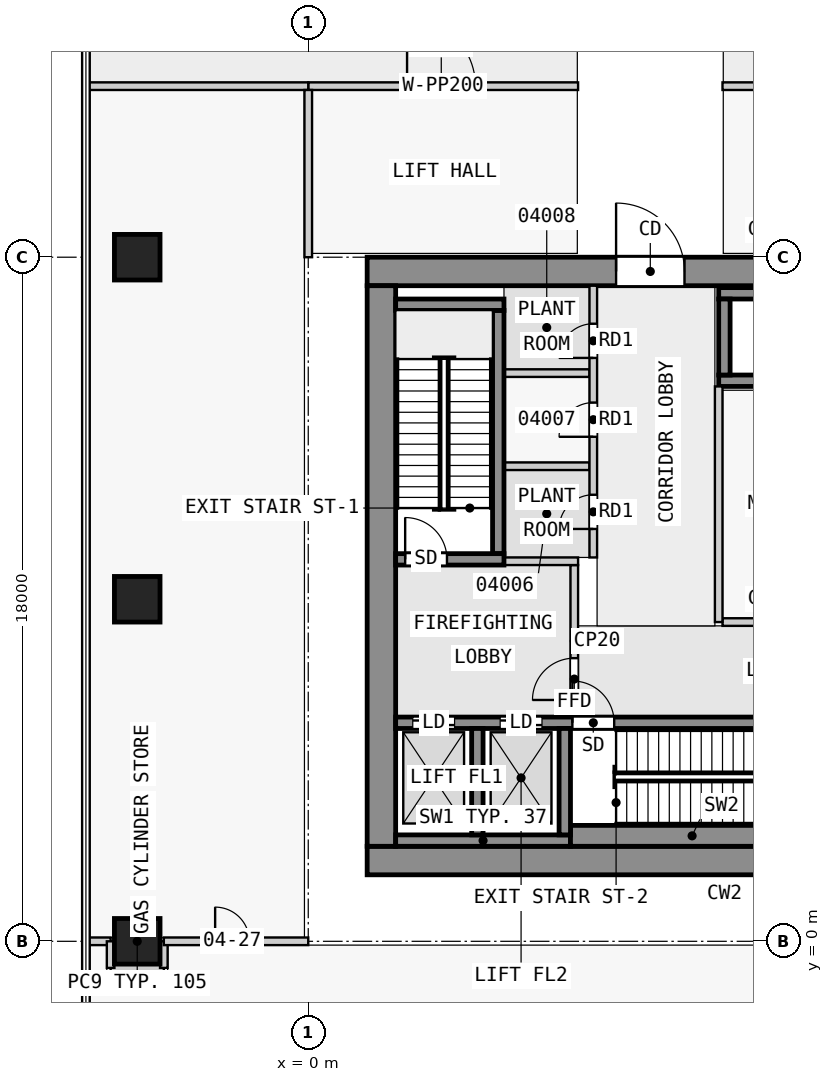
"""IFC4 building model, lengths in metres.
Left out: names, types, materials, properties, quantities, classifications, styles, units other than length and angle.
Written with IfcOpenShell. Run it as: python <this file> out.ifc"""

import sys

from ifc_helpers import new_model, si_unit, direction, frame, frame_2d, origin, origin_2d, place, context, subcontext, project, spatial, rectangle, extrude, element, fill, save


model = new_model("IFC4")
c1 = context("Model", 3, precision=1e-05, world=origin(), true_north=direction((0.0, 1.0)))
c2 = subcontext(c1, "Body", "Model", "MODEL_VIEW")
j1 = project(units=[si_unit("LENGTHUNIT", "METRE"), si_unit("PLANEANGLEUNIT", "RADIAN")], contexts=[c1])
p1 = place(None, origin())
s1 = spatial("IfcSite", under=j1, at=p1, CompositionType="ELEMENT")
p2 = place(p1, origin())
s2 = spatial("IfcBuilding", under=s1, at=p2, CompositionType="ELEMENT")
p3 = place(p2, frame((0.0, 0.0, 21.8)))
s3 = spatial("IfcBuildingStorey", under=s2, at=p3, CompositionType="ELEMENT", Elevation=21.8)
for number, where, z_axis, x_axis in (
    (1, (-4.5, 0.0, 0.0), (0.0, 0.0, 1.0), (1.0, 0.0, 0.0)),
    (2, (-4.5, 9.0, 0.0), (0.0, 0.0, 1.0), (1.0, 0.0, 0.0)),
    (3, (-4.5, 18.0, 0.0), (0.0, 0.0, 1.0), (1.0, 0.0, 0.0)),
):
    element("IfcColumn", number, at=place(p3, frame(where, z_axis=z_axis, x_axis=x_axis)), inside=s3, PredefinedType="COLUMN", context=c2, shape_type="SweptSolid", body=[
        extrude(rectangle(XDim=1.2, YDim=1.2, at=origin_2d()), origin(), (0.0, 0.0, 1.0), 5.0),
    ])
p4 = place(p3, frame((1.55, 2.125, 0.0), z_axis=(0.0, 0.0, 1.0), x_axis=(1.0, 0.0, 0.0)))
e4 = element("IfcWall", 4, at=p4, inside=s3, PredefinedType="SHEAR", context=c2, shape_type="SweptSolid", body=[
    extrude(rectangle(XDim=20.95, YDim=0.75, at=frame_2d((10.475, 0.0))), origin(), (0.0, 0.0, 1.0), 4.5),
])
p5 = place(p3, frame((1.55, 17.625, 0.0), z_axis=(0.0, 0.0, 1.0), x_axis=(1.0, 0.0, 0.0)))
e5 = element("IfcWall", 5, at=p5, inside=s3, PredefinedType="SHEAR", context=c2, shape_type="SweptSolid", body=[
    extrude(rectangle(XDim=20.95, YDim=0.75, at=frame_2d((10.475, 0.0))), origin(), (0.0, 0.0, 1.0), 4.5),
])
p6 = place(p5, frame((6.55, 0.0, 0.0)))
e6 = element("IfcOpeningElement", 6, at=p6, cuts=e5, PredefinedType="OPENING", context=c2, shape_type="SweptSolid", body=[
    extrude(rectangle(XDim=1.8, YDim=2.1, at=frame_2d((0.9, 1.05))), frame((0.0, 0.385, 0.0), z_axis=(0.0, -1.0, 0.0), x_axis=(1.0, 0.0, 0.0)), (0.0, 0.0, 1.0), 0.77),
])
p7 = place(p3, frame((1.925, 2.5, 0.0), z_axis=(0.0, 0.0, 1.0), x_axis=(0.0, 1.0, 0.0)))
e7 = element("IfcWall", 7, at=p7, inside=s3, PredefinedType="SHEAR", context=c2, shape_type="SweptSolid", body=[
    extrude(rectangle(XDim=14.75, YDim=0.75, at=frame_2d((7.375, 0.0))), origin(), (0.0, 0.0, 1.0), 4.5),
])
p8 = place(p3, frame((2.3, 2.65, 0.0), z_axis=(0.0, 0.0, 1.0), x_axis=(1.0, 0.0, 0.0)))
e8 = element("IfcWall", 8, at=p8, inside=s3, PredefinedType="SHEAR", context=c2, shape_type="SweptSolid", body=[
    extrude(rectangle(XDim=4.6, YDim=0.3, at=frame_2d((2.3, 0.0))), origin(), (0.0, 0.0, 1.0), 4.5),
])
p9 = place(p3, frame((6.9, 2.775, 0.0), z_axis=(0.0, 0.0, 1.0), x_axis=(1.0, 0.0, 0.0)))
e9 = element("IfcWall", 9, at=p9, inside=s3, PredefinedType="SHEAR", context=c2, shape_type="SweptSolid", body=[
    extrude(rectangle(XDim=6.4, YDim=0.55, at=frame_2d((3.2, 0.0))), origin(), (0.0, 0.0, 1.0), 4.5),
])
for number, where, z_axis, x_axis in (
    (10, (4.45, 2.8, 0.0), (0.0, 0.0, 1.0), (0.0, 1.0, 0.0)),
    (11, (6.75, 2.8, 0.0), (0.0, 0.0, 1.0), (0.0, 1.0, 0.0)),
):
    element("IfcWall", number, at=place(p3, frame(where, z_axis=z_axis, x_axis=x_axis)), inside=s3, PredefinedType="SHEAR", context=c2, shape_type="SweptSolid", body=[
        extrude(rectangle(XDim=2.8, YDim=0.3, at=frame_2d((1.4, 0.0))), origin(), (0.0, 0.0, 1.0), 4.5),
    ])
p10 = place(p3, frame((2.3, 5.75, 0.0), z_axis=(0.0, 0.0, 1.0), x_axis=(1.0, 0.0, 0.0)))
e12 = element("IfcWall", 12, at=p10, inside=s3, PredefinedType="SHEAR", context=c2, shape_type="SweptSolid", body=[
    extrude(rectangle(XDim=18.8, YDim=0.3, at=frame_2d((9.4, 0.0))), origin(), (0.0, 0.0, 1.0), 4.5),
])
p11 = place(p10, frame((4.65, 0.0, 0.0)))
e13 = element("IfcOpeningElement", 13, at=p11, cuts=e12, PredefinedType="OPENING", context=c2, shape_type="SweptSolid", body=[
    extrude(rectangle(XDim=1.1, YDim=2.1, at=frame_2d((0.55, 1.05))), frame((0.0, 0.16, 0.0), z_axis=(0.0, -1.0, 0.0), x_axis=(1.0, 0.0, 0.0)), (0.0, 0.0, 1.0), 0.32),
])
p12 = place(p10, frame((0.45, 0.0, 0.0)))
e14 = element("IfcOpeningElement", 14, at=p12, cuts=e12, PredefinedType="OPENING", context=c2, shape_type="SweptSolid", body=[
    extrude(rectangle(XDim=1.1, YDim=2.1, at=frame_2d((0.55, 1.05))), frame((0.0, 0.16, 0.0), z_axis=(0.0, -1.0, 0.0), x_axis=(1.0, 0.0, 0.0)), (0.0, 0.0, 1.0), 0.32),
])
p13 = place(p10, frame((2.75, 0.0, 0.0)))
e15 = element("IfcOpeningElement", 15, at=p13, cuts=e12, PredefinedType="OPENING", context=c2, shape_type="SweptSolid", body=[
    extrude(rectangle(XDim=1.1, YDim=2.1, at=frame_2d((0.55, 1.05))), frame((0.0, 0.16, 0.0), z_axis=(0.0, -1.0, 0.0), x_axis=(1.0, 0.0, 0.0)), (0.0, 0.0, 1.0), 0.32),
])
p14 = place(p10, frame((11.85, 0.0, 0.0)))
e16 = element("IfcOpeningElement", 16, at=p14, cuts=e12, PredefinedType="OPENING", context=c2, shape_type="SweptSolid", body=[
    extrude(rectangle(XDim=1.1, YDim=2.1, at=frame_2d((0.55, 1.05))), frame((0.0, 0.16, 0.0), z_axis=(0.0, -1.0, 0.0), x_axis=(1.0, 0.0, 0.0)), (0.0, 0.0, 1.0), 0.32),
])
p15 = place(p10, frame((14.35, 0.0, 0.0)))
e17 = element("IfcOpeningElement", 17, at=p15, cuts=e12, PredefinedType="OPENING", context=c2, shape_type="SweptSolid", body=[
    extrude(rectangle(XDim=1.1, YDim=2.1, at=frame_2d((0.55, 1.05))), frame((0.0, 0.16, 0.0), z_axis=(0.0, -1.0, 0.0), x_axis=(1.0, 0.0, 0.0)), (0.0, 0.0, 1.0), 0.32),
])
p16 = place(p10, frame((16.85, 0.0, 0.0)))
e18 = element("IfcOpeningElement", 18, at=p16, cuts=e12, PredefinedType="OPENING", context=c2, shape_type="SweptSolid", body=[
    extrude(rectangle(XDim=1.1, YDim=2.1, at=frame_2d((0.55, 1.05))), frame((0.0, 0.16, 0.0), z_axis=(0.0, -1.0, 0.0), x_axis=(1.0, 0.0, 0.0)), (0.0, 0.0, 1.0), 0.32),
])
p17 = place(p3, frame((2.3, 10.05, 0.0), z_axis=(0.0, 0.0, 1.0), x_axis=(1.0, 0.0, 0.0)))
e19 = element("IfcWall", 19, at=p17, inside=s3, PredefinedType="SHEAR", context=c2, shape_type="SweptSolid", body=[
    extrude(rectangle(XDim=2.85, YDim=0.3, at=frame_2d((1.425, 0.0))), origin(), (0.0, 0.0, 1.0), 4.5),
])
p18 = place(p17, frame((0.25, 0.0, 0.0)))
e20 = element("IfcOpeningElement", 20, at=p18, cuts=e19, PredefinedType="OPENING", context=c2, shape_type="SweptSolid", body=[
    extrude(rectangle(XDim=1.1, YDim=2.1, at=frame_2d((0.55, 1.05))), frame((0.0, 0.16, 0.0), z_axis=(0.0, -1.0, 0.0), x_axis=(1.0, 0.0, 0.0)), (0.0, 0.0, 1.0), 0.32),
])
p19 = place(p3, frame((5.0, 10.2, 0.0), z_axis=(0.0, 0.0, 1.0), x_axis=(0.0, 1.0, 0.0)))
e21 = element("IfcWall", 21, at=p19, inside=s3, PredefinedType="SHEAR", context=c2, shape_type="SweptSolid", body=[
    extrude(rectangle(XDim=6.4, YDim=0.3, at=frame_2d((3.2, 0.0))), origin(), (0.0, 0.0, 1.0), 4.5),
])
p20 = place(p3, frame((2.3, 16.75, 0.0), z_axis=(0.0, 0.0, 1.0), x_axis=(1.0, 0.0, 0.0)))
e22 = element("IfcWall", 22, at=p20, inside=s3, PredefinedType="SHEAR", context=c2, shape_type="SweptSolid", body=[
    extrude(rectangle(XDim=2.85, YDim=0.3, at=frame_2d((1.425, 0.0))), origin(), (0.0, 0.0, 1.0), 4.5),
])
for number, where, z_axis, x_axis in (
    (23, (10.8, 17.05, 0.0), (0.0, 0.0, 1.0), (1.0, 0.0, 0.0)),
    (24, (10.8, 14.75, 0.0), (0.0, 0.0, 1.0), (1.0, 0.0, 0.0)),
):
    element("IfcWall", number, at=place(p3, frame(where, z_axis=z_axis, x_axis=x_axis)), inside=s3, PredefinedType="SHEAR", context=c2, shape_type="SweptSolid", body=[
        extrude(rectangle(XDim=7.8, YDim=0.3, at=frame_2d((3.9, 0.0))), origin(), (0.0, 0.0, 1.0), 4.5),
    ])
p21 = place(p3, frame((10.95, 14.9, 0.0), z_axis=(0.0, 0.0, 1.0), x_axis=(0.0, 1.0, 0.0)))
e25 = element("IfcWall", 25, at=p21, inside=s3, PredefinedType="SHEAR", context=c2, shape_type="SweptSolid", body=[
    extrude(rectangle(XDim=2.0, YDim=0.3, at=frame_2d((1.0, 0.0))), origin(), (0.0, 0.0, 1.0), 4.5),
])
p22 = place(p3, frame((7.0, 5.9, 0.0), z_axis=(0.0, 0.0, 1.0), x_axis=(0.0, 1.0, 0.0)))
e26 = element("IfcWall", 26, at=p22, inside=s3, PredefinedType="PARTITIONING", context=c2, shape_type="SweptSolid", body=[
    extrude(rectangle(XDim=4.0, YDim=0.2, at=frame_2d((2.0, 0.0))), origin(), (0.0, 0.0, 1.0), 4.5),
])
p23 = place(p22, frame((0.45, 0.0, 0.0)))
e27 = element("IfcOpeningElement", 27, at=p23, cuts=e26, PredefinedType="OPENING", context=c2, shape_type="SweptSolid", body=[
    extrude(rectangle(XDim=1.1, YDim=2.1, at=frame_2d((0.55, 1.05))), frame((0.0, 0.11, 0.0), z_axis=(0.0, -1.0, 0.0), x_axis=(1.0, 0.0, 0.0)), (0.0, 0.0, 1.0), 0.22),
])
p24 = place(p3, frame((5.15, 10.0, 0.0), z_axis=(0.0, 0.0, 1.0), x_axis=(1.0, 0.0, 0.0)))
e28 = element("IfcWall", 28, at=p24, inside=s3, PredefinedType="PARTITIONING", context=c2, shape_type="SweptSolid", body=[
    extrude(rectangle(XDim=1.95, YDim=0.2, at=frame_2d((0.975, 0.0))), origin(), (0.0, 0.0, 1.0), 4.5),
])
p25 = place(p3, frame((10.8, 8.4, 0.0), z_axis=(0.0, 0.0, 1.0), x_axis=(0.0, 1.0, 0.0)))
e29 = element("IfcWall", 29, at=p25, inside=s3, PredefinedType="PARTITIONING", context=c2, shape_type="SweptSolid", body=[
    extrude(rectangle(XDim=6.2, YDim=0.2, at=frame_2d((3.1, 0.0))), origin(), (0.0, 0.0, 1.0), 4.5),
])
p26 = place(p3, frame((10.9, 8.4, 0.0), z_axis=(0.0, 0.0, 1.0), x_axis=(1.0, 0.0, 0.0)))
e30 = element("IfcWall", 30, at=p26, inside=s3, PredefinedType="PARTITIONING", context=c2, shape_type="SweptSolid", body=[
    extrude(rectangle(XDim=5.0, YDim=0.2, at=frame_2d((2.5, 0.0))), origin(), (0.0, 0.0, 1.0), 4.5),
])
p27 = place(p3, frame((7.5, 10.1, 0.0), z_axis=(0.0, 0.0, 1.0), x_axis=(0.0, 1.0, 0.0)))
e31 = element("IfcWall", 31, at=p27, inside=s3, PredefinedType="PARTITIONING", context=c2, shape_type="SweptSolid", body=[
    extrude(rectangle(XDim=7.15, YDim=0.2, at=frame_2d((3.575, 0.0))), origin(), (0.0, 0.0, 1.0), 4.5),
])
p28 = place(p27, frame((0.75, 0.0, 0.0)))
e32 = element("IfcOpeningElement", 32, at=p28, cuts=e31, PredefinedType="OPENING", context=c2, shape_type="SweptSolid", body=[
    extrude(rectangle(XDim=0.9, YDim=2.1, at=frame_2d((0.45, 1.05))), frame((0.0, 0.11, 0.0), z_axis=(0.0, -1.0, 0.0), x_axis=(1.0, 0.0, 0.0)), (0.0, 0.0, 1.0), 0.22),
])
p29 = place(p27, frame((3.175, 0.0, 0.0)))
e33 = element("IfcOpeningElement", 33, at=p29, cuts=e31, PredefinedType="OPENING", context=c2, shape_type="SweptSolid", body=[
    extrude(rectangle(XDim=0.9, YDim=2.1, at=frame_2d((0.45, 1.05))), frame((0.0, 0.11, 0.0), z_axis=(0.0, -1.0, 0.0), x_axis=(1.0, 0.0, 0.0)), (0.0, 0.0, 1.0), 0.22),
])
p30 = place(p27, frame((5.25, 0.0, 0.0)))
e34 = element("IfcOpeningElement", 34, at=p30, cuts=e31, PredefinedType="OPENING", context=c2, shape_type="SweptSolid", body=[
    extrude(rectangle(XDim=0.9, YDim=2.1, at=frame_2d((0.45, 1.05))), frame((0.0, 0.11, 0.0), z_axis=(0.0, -1.0, 0.0), x_axis=(1.0, 0.0, 0.0)), (0.0, 0.0, 1.0), 0.22),
])
for number, where, z_axis, x_axis in (
    (35, (5.15, 12.5, 0.0), (0.0, 0.0, 1.0), (1.0, 0.0, 0.0)),
    (36, (5.15, 14.95, 0.0), (0.0, 0.0, 1.0), (1.0, 0.0, 0.0)),
):
    element("IfcWall", number, at=place(p3, frame(where, z_axis=z_axis, x_axis=x_axis)), inside=s3, PredefinedType="PARTITIONING", context=c2, shape_type="SweptSolid", body=[
        extrude(rectangle(XDim=2.25, YDim=0.2, at=frame_2d((1.125, 0.0))), origin(), (0.0, 0.0, 1.0), 4.5),
    ])
p31 = place(p3, frame((10.9, 22.5, 0.0), z_axis=(0.0, 0.0, 1.0), x_axis=(1.0, 0.0, 0.0)))
e37 = element("IfcWall", 37, at=p31, inside=s3, PredefinedType="PARTITIONING", context=c2, shape_type="SweptSolid", body=[
    extrude(rectangle(XDim=11.6, YDim=0.2, at=frame_2d((5.8, 0.0))), origin(), (0.0, 0.0, 1.0), 4.5),
])
p32 = place(p31, frame((3.1, 0.0, 0.0)))
e38 = element("IfcOpeningElement", 38, at=p32, cuts=e37, PredefinedType="OPENING", context=c2, shape_type="SweptSolid", body=[
    extrude(rectangle(XDim=1.8, YDim=2.1, at=frame_2d((0.9, 1.05))), frame((0.0, 0.11, 0.0), z_axis=(0.0, -1.0, 0.0), x_axis=(1.0, 0.0, 0.0)), (0.0, 0.0, 1.0), 0.22),
])
p33 = place(p3, frame((0.0, 22.5, 0.0), z_axis=(0.0, 0.0, 1.0), x_axis=(1.0, 0.0, 0.0)))
e39 = element("IfcWall", 39, at=p33, inside=s3, PredefinedType="PARTITIONING", context=c2, shape_type="SweptSolid", body=[
    extrude(rectangle(XDim=7.1, YDim=0.2, at=frame_2d((3.55, 0.0))), origin(), (0.0, 0.0, 1.0), 4.5),
])
p34 = place(p33, frame((2.6, 0.0, 0.0)))
e40 = element("IfcOpeningElement", 40, at=p34, cuts=e39, PredefinedType="OPENING", context=c2, shape_type="SweptSolid", body=[
    extrude(rectangle(XDim=1.8, YDim=2.1, at=frame_2d((0.9, 1.05))), frame((0.0, 0.11, 0.0), z_axis=(0.0, -1.0, 0.0), x_axis=(1.0, 0.0, 0.0)), (0.0, 0.0, 1.0), 0.22),
])
p35 = place(p3, frame((-5.2, -0.7, 0.0), z_axis=(0.0, 0.0, 1.0), x_axis=(1.0, 0.0, 0.0)))
e41 = element("IfcWall", 41, at=p35, inside=s3, PredefinedType="PARTITIONING", context=c2, shape_type="SweptSolid", body=[
    extrude(rectangle(XDim=1.4, YDim=0.2, at=frame_2d((0.7, 0.0))), origin(), (0.0, 0.0, 1.0), 4.5),
])
p36 = place(p3, frame((-3.8, -0.7, 0.0), z_axis=(0.0, 0.0, 1.0), x_axis=(0.0, 1.0, 0.0)))
e42 = element("IfcWall", 42, at=p36, inside=s3, PredefinedType="PARTITIONING", context=c2, shape_type="SweptSolid", body=[
    extrude(rectangle(XDim=0.7, YDim=0.2, at=frame_2d((0.35, 0.0))), origin(), (0.0, 0.0, 1.0), 4.5),
])
p37 = place(p3, frame((-3.8, 0.0, 0.0), z_axis=(0.0, 0.0, 1.0), x_axis=(1.0, 0.0, 0.0)))
e43 = element("IfcWall", 43, at=p37, inside=s3, PredefinedType="PARTITIONING", context=c2, shape_type="SweptSolid", body=[
    extrude(rectangle(XDim=3.8, YDim=0.2, at=frame_2d((1.9, 0.0))), origin(), (0.0, 0.0, 1.0), 4.5),
])
p38 = place(p37, frame((1.35, 0.0, 0.0)))
e44 = element("IfcOpeningElement", 44, at=p38, cuts=e43, PredefinedType="OPENING", context=c2, shape_type="SweptSolid", body=[
    extrude(rectangle(XDim=0.9, YDim=2.1, at=frame_2d((0.45, 1.05))), frame((0.0, 0.11, 0.0), z_axis=(0.0, -1.0, 0.0), x_axis=(1.0, 0.0, 0.0)), (0.0, 0.0, 1.0), 0.22),
])
p39 = place(p3, frame((0.0, 22.5, 0.0), z_axis=(0.0, 0.0, 1.0), x_axis=(-1.0, 0.0, 0.0)))
e45 = element("IfcWall", 45, at=p39, inside=s3, PredefinedType="PARTITIONING", context=c2, shape_type="SweptSolid", body=[
    extrude(rectangle(XDim=5.85, YDim=0.2, at=frame_2d((2.925, 0.0))), origin(), (0.0, 0.0, 1.0), 4.5),
])
p40 = place(p3, frame((0.0, 18.0, 0.0), z_axis=(0.0, 0.0, 1.0), x_axis=(0.0, 1.0, 0.0)))
e46 = element("IfcWall", 46, at=p40, inside=s3, PredefinedType="PARTITIONING", context=c2, shape_type="SweptSolid", body=[
    extrude(rectangle(XDim=4.4, YDim=0.2, at=frame_2d((2.2, 0.0))), origin(), (0.0, 0.0, 1.0), 4.5),
])
p41 = place(p3, frame((-5.85, 0.0, 0.0), z_axis=(0.0, 0.0, 1.0), x_axis=(1.0, 0.0, 0.0)))
e47 = element("IfcWall", 47, at=p41, inside=s3, PredefinedType="PARTITIONING", context=c2, shape_type="SweptSolid", body=[
    extrude(rectangle(XDim=0.65, YDim=0.2, at=frame_2d((0.325, 0.0))), origin(), (0.0, 0.0, 1.0), 4.5),
])
p42 = place(p3, frame((-5.2, 0.0, 0.0), z_axis=(0.0, 0.0, 1.0), x_axis=(0.0, -1.0, 0.0)))
e48 = element("IfcWall", 48, at=p42, inside=s3, PredefinedType="PARTITIONING", context=c2, shape_type="SweptSolid", body=[
    extrude(rectangle(XDim=0.7, YDim=0.2, at=frame_2d((0.35, 0.0))), origin(), (0.0, 0.0, 1.0), 4.5),
])
p43 = place(p23, origin())
e49 = element("IfcDoor", 49, at=p43, inside=s3, OperationType="SINGLE_SWING_LEFT", PredefinedType="DOOR", context=c2, shape_type="SweptSolid", body=[
    extrude(rectangle(XDim=1.1, YDim=2.1, at=frame_2d((0.55, 1.05))), frame((0.0, 0.025, 0.0), z_axis=(0.0, -1.0, 0.0), x_axis=(1.0, 0.0, 0.0)), (0.0, 0.0, 1.0), 0.05),
])
fill(e27, e49)
p44 = place(p18, origin())
e50 = element("IfcDoor", 50, at=p44, inside=s3, OperationType="SINGLE_SWING_RIGHT", PredefinedType="DOOR", context=c2, shape_type="SweptSolid", body=[
    extrude(rectangle(XDim=1.1, YDim=2.1, at=frame_2d((0.55, 1.05))), frame((0.0, 0.025, 0.0), z_axis=(0.0, -1.0, 0.0), x_axis=(1.0, 0.0, 0.0)), (0.0, 0.0, 1.0), 0.05),
])
fill(e20, e50)
p45 = place(p11, origin())
e51 = element("IfcDoor", 51, at=p45, inside=s3, OperationType="SINGLE_SWING_LEFT", PredefinedType="DOOR", context=c2, shape_type="SweptSolid", body=[
    extrude(rectangle(XDim=1.1, YDim=2.1, at=frame_2d((0.55, 1.05))), frame((0.0, 0.025, 0.0), z_axis=(0.0, -1.0, 0.0), x_axis=(1.0, 0.0, 0.0)), (0.0, 0.0, 1.0), 0.05),
])
fill(e13, e51)
p46 = place(p12, origin())
e52 = element("IfcDoor", 52, at=p46, inside=s3, OperationType="DOUBLE_DOOR_SLIDING", PredefinedType="DOOR", context=c2, shape_type="SweptSolid", body=[
    extrude(rectangle(XDim=1.1, YDim=2.1, at=frame_2d((0.55, 1.05))), frame((0.0, 0.025, 0.0), z_axis=(0.0, -1.0, 0.0), x_axis=(1.0, 0.0, 0.0)), (0.0, 0.0, 1.0), 0.05),
])
fill(e14, e52)
p47 = place(p13, origin())
e53 = element("IfcDoor", 53, at=p47, inside=s3, OperationType="DOUBLE_DOOR_SLIDING", PredefinedType="DOOR", context=c2, shape_type="SweptSolid", body=[
    extrude(rectangle(XDim=1.1, YDim=2.1, at=frame_2d((0.55, 1.05))), frame((0.0, 0.025, 0.0), z_axis=(0.0, -1.0, 0.0), x_axis=(1.0, 0.0, 0.0)), (0.0, 0.0, 1.0), 0.05),
])
fill(e15, e53)
p48 = place(p6, origin())
e54 = element("IfcDoor", 54, at=p48, inside=s3, OperationType="DOUBLE_DOOR_SINGLE_SWING", PredefinedType="DOOR", context=c2, shape_type="SweptSolid", body=[
    extrude(rectangle(XDim=1.8, YDim=2.1, at=frame_2d((0.9, 1.05))), frame((0.0, 0.025, 0.0), z_axis=(0.0, -1.0, 0.0), x_axis=(1.0, 0.0, 0.0)), (0.0, 0.0, 1.0), 0.05),
])
fill(e6, e54)
p49 = place(p28, origin())
e55 = element("IfcDoor", 55, at=p49, inside=s3, OperationType="SINGLE_SWING_RIGHT", PredefinedType="DOOR", context=c2, shape_type="SweptSolid", body=[
    extrude(rectangle(XDim=0.9, YDim=2.1, at=frame_2d((0.45, 1.05))), frame((0.0, 0.025, 0.0), z_axis=(0.0, -1.0, 0.0), x_axis=(1.0, 0.0, 0.0)), (0.0, 0.0, 1.0), 0.05),
])
fill(e32, e55)
p50 = place(p29, origin())
e56 = element("IfcDoor", 56, at=p50, inside=s3, OperationType="SINGLE_SWING_RIGHT", PredefinedType="DOOR", context=c2, shape_type="SweptSolid", body=[
    extrude(rectangle(XDim=0.9, YDim=2.1, at=frame_2d((0.45, 1.05))), frame((0.0, 0.025, 0.0), z_axis=(0.0, -1.0, 0.0), x_axis=(1.0, 0.0, 0.0)), (0.0, 0.0, 1.0), 0.05),
])
fill(e33, e56)
p51 = place(p30, origin())
e57 = element("IfcDoor", 57, at=p51, inside=s3, OperationType="SINGLE_SWING_RIGHT", PredefinedType="DOOR", context=c2, shape_type="SweptSolid", body=[
    extrude(rectangle(XDim=0.9, YDim=2.1, at=frame_2d((0.45, 1.05))), frame((0.0, 0.025, 0.0), z_axis=(0.0, -1.0, 0.0), x_axis=(1.0, 0.0, 0.0)), (0.0, 0.0, 1.0), 0.05),
])
fill(e34, e57)
p52 = place(p34, origin())
e58 = element("IfcDoor", 58, at=p52, inside=s3, OperationType="DOUBLE_DOOR_SINGLE_SWING", PredefinedType="DOOR", context=c2, shape_type="SweptSolid", body=[
    extrude(rectangle(XDim=1.8, YDim=2.1, at=frame_2d((0.9, 1.05))), frame((0.0, 0.025, 0.0), z_axis=(0.0, -1.0, 0.0), x_axis=(1.0, 0.0, 0.0)), (0.0, 0.0, 1.0), 0.05),
])
fill(e40, e58)
p53 = place(p38, origin())
e59 = element("IfcDoor", 59, at=p53, inside=s3, OperationType="SINGLE_SWING_LEFT", PredefinedType="DOOR", context=c2, shape_type="SweptSolid", body=[
    extrude(rectangle(XDim=0.9, YDim=2.1, at=frame_2d((0.45, 1.05))), frame((0.0, 0.025, 0.0), z_axis=(0.0, -1.0, 0.0), x_axis=(1.0, 0.0, 0.0)), (0.0, 0.0, 1.0), 0.05),
])
fill(e44, e59)
save(model, sys.argv[1])
